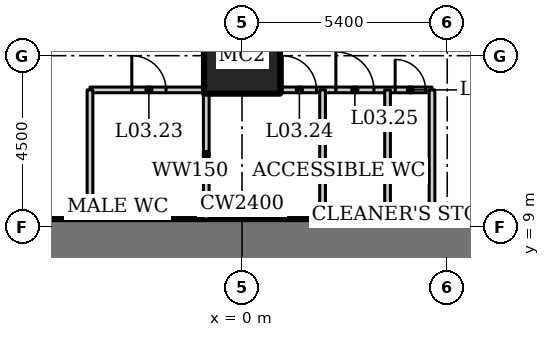
"""IFC4 building model, lengths in metres.
Left out: names, types, materials, properties, quantities, classifications, styles, units other than length and angle.
Written with IfcOpenShell. Run it as: python <this file> out.ifc"""

import sys

from ifc_helpers import new_model, si_unit, direction, frame, frame_2d, origin, origin_2d, place, context, subcontext, project, spatial, rectangle, hollow_rectangle, extrude, element, fill, save


model = new_model("IFC4")
c1 = context("Model", 3, precision=1e-05, world=origin(), true_north=direction((0.0, 1.0)))
c2 = subcontext(c1, "Body", "Model", "MODEL_VIEW")
j1 = project(units=[si_unit("LENGTHUNIT", "METRE"), si_unit("PLANEANGLEUNIT", "RADIAN")], contexts=[c1])
p1 = place(None, origin())
s1 = spatial("IfcSite", under=j1, at=p1, CompositionType="ELEMENT")
p2 = place(p1, origin())
s2 = spatial("IfcBuilding", under=s1, at=p2, CompositionType="ELEMENT")
p3 = place(p2, frame((0.0, 0.0, 22.0)))
s3 = spatial("IfcBuildingStorey", under=s2, at=p3, CompositionType="ELEMENT", Elevation=22.0)
p4 = place(p3, frame((0.0, 13.5, 0.0), z_axis=(0.0, 0.0, 1.0), x_axis=(1.0, 0.0, 0.0)))
e1 = element("IfcColumn", 1, at=p4, inside=s3, PredefinedType="COLUMN", context=c2, shape_type="SweptSolid", body=[
    extrude(hollow_rectangle(XDim=2.0, YDim=2.0, WallThickness=0.17, at=origin_2d()), origin(), (0.0, 0.0, 1.0), 5.0),
])
p5 = place(p3, frame((12.2, 8.0, 0.0), z_axis=(0.0, 0.0, 1.0), x_axis=(-1.0, 0.0, 0.0)))
e2 = element("IfcWall", 2, at=p5, inside=s3, PredefinedType="SHEAR", context=c2, shape_type="SweptSolid", body=[
    extrude(rectangle(XDim=24.4, YDim=2.4, at=frame_2d((12.2, 0.0))), origin(), (0.0, 0.0, 1.0), 5.0),
])
p6 = place(p3, frame((-4.0, 12.6, 0.0), z_axis=(0.0, 0.0, 1.0), x_axis=(1.0, 0.0, 0.0)))
e3 = element("IfcWall", 3, at=p6, inside=s3, PredefinedType="SOLIDWALL", context=c2, shape_type="SweptSolid", body=[
    extrude(rectangle(XDim=9.0, YDim=0.15, at=frame_2d((4.5, 0.0))), origin(), (0.0, 0.0, 1.0), 4.8),
])
p7 = place(p6, frame((1.1, 0.0, 0.0)))
e4 = element("IfcOpeningElement", 4, at=p7, cuts=e3, PredefinedType="OPENING", context=c2, shape_type="SweptSolid", body=[
    extrude(rectangle(XDim=0.9, YDim=2.1, at=frame_2d((0.45, 1.05))), frame((0.0, 0.085, 0.0), z_axis=(0.0, -1.0, 0.0), x_axis=(1.0, 0.0, 0.0)), (0.0, 0.0, 1.0), 0.17),
])
p8 = place(p6, frame((5.06, 0.0, 0.0)))
e5 = element("IfcOpeningElement", 5, at=p8, cuts=e3, PredefinedType="OPENING", context=c2, shape_type="SweptSolid", body=[
    extrude(rectangle(XDim=0.9, YDim=2.1, at=frame_2d((0.45, 1.05))), frame((0.0, 0.085, 0.0), z_axis=(0.0, -1.0, 0.0), x_axis=(1.0, 0.0, 0.0)), (0.0, 0.0, 1.0), 0.17),
])
p9 = place(p6, frame((6.47, 0.0, 0.0)))
e6 = element("IfcOpeningElement", 6, at=p9, cuts=e3, PredefinedType="OPENING", context=c2, shape_type="SweptSolid", body=[
    extrude(rectangle(XDim=1.0, YDim=2.1, at=frame_2d((0.5, 1.05))), frame((0.0, 0.085, 0.0), z_axis=(0.0, -1.0, 0.0), x_axis=(1.0, 0.0, 0.0)), (0.0, 0.0, 1.0), 0.17),
])
p10 = place(p6, frame((8.03, 0.0, 0.0)))
e7 = element("IfcOpeningElement", 7, at=p10, cuts=e3, PredefinedType="OPENING", context=c2, shape_type="SweptSolid", body=[
    extrude(rectangle(XDim=0.8, YDim=2.1, at=frame_2d((0.4, 1.05))), frame((0.0, 0.085, 0.0), z_axis=(0.0, -1.0, 0.0), x_axis=(1.0, 0.0, 0.0)), (0.0, 0.0, 1.0), 0.17),
])
for number, where, z_axis, x_axis in (
    (8, (-4.0, 9.2, 0.0), (0.0, 0.0, 1.0), (0.0, 1.0, 0.0)),
    (9, (5.0, 9.2, 0.0), (0.0, 0.0, 1.0), (0.0, 1.0, 0.0)),
    (10, (-0.94, 9.2, 0.0), (0.0, 0.0, 1.0), (0.0, 1.0, 0.0)),
):
    element("IfcWall", number, at=place(p3, frame(where, z_axis=z_axis, x_axis=x_axis)), inside=s3, PredefinedType="SOLIDWALL", context=c2, shape_type="SweptSolid", body=[
        extrude(rectangle(XDim=3.4, YDim=0.15, at=frame_2d((1.7, 0.0))), origin(), (0.0, 0.0, 1.0), 4.8),
    ])
p11 = place(p3, frame((2.12, 9.2, 0.0), z_axis=(0.0, 0.0, 1.0), x_axis=(0.0, 1.0, 0.0)))
e11 = element("IfcWall", 11, at=p11, inside=s3, PredefinedType="SOLIDWALL", context=c2, shape_type="SweptSolid", body=[
    extrude(rectangle(XDim=3.4, YDim=0.15, at=frame_2d((1.7, 0.0))), origin(), (0.0, 0.0, 1.0), 3.3),
])
p12 = place(p3, frame((3.83, 9.2, 0.0), z_axis=(0.0, 0.0, 1.0), x_axis=(0.0, 1.0, 0.0)))
e12 = element("IfcWall", 12, at=p12, inside=s3, PredefinedType="SOLIDWALL", context=c2, shape_type="SweptSolid", body=[
    extrude(rectangle(XDim=3.4, YDim=0.15, at=frame_2d((1.7, 0.0))), origin(), (0.0, 0.0, 1.0), 4.8),
])
p13 = place(p7, origin())
e13 = element("IfcDoor", 13, at=p13, inside=s3, OperationType="SINGLE_SWING_LEFT", PredefinedType="DOOR", context=c2, shape_type="SweptSolid", body=[
    extrude(rectangle(XDim=0.9, YDim=2.1, at=frame_2d((0.45, 1.05))), frame((0.0, 0.025, 0.0), z_axis=(0.0, -1.0, 0.0), x_axis=(1.0, 0.0, 0.0)), (0.0, 0.0, 1.0), 0.05),
])
fill(e4, e13)
p14 = place(p8, origin())
e14 = element("IfcDoor", 14, at=p14, inside=s3, OperationType="SINGLE_SWING_LEFT", PredefinedType="DOOR", context=c2, shape_type="SweptSolid", body=[
    extrude(rectangle(XDim=0.9, YDim=2.1, at=frame_2d((0.45, 1.05))), frame((0.0, 0.025, 0.0), z_axis=(0.0, -1.0, 0.0), x_axis=(1.0, 0.0, 0.0)), (0.0, 0.0, 1.0), 0.05),
])
fill(e5, e14)
p15 = place(p9, origin())
e15 = element("IfcDoor", 15, at=p15, inside=s3, OperationType="SINGLE_SWING_LEFT", PredefinedType="DOOR", context=c2, shape_type="SweptSolid", body=[
    extrude(rectangle(XDim=1.0, YDim=2.1, at=frame_2d((0.5, 1.05))), frame((0.0, 0.025, 0.0), z_axis=(0.0, -1.0, 0.0), x_axis=(1.0, 0.0, 0.0)), (0.0, 0.0, 1.0), 0.05),
])
fill(e6, e15)
p16 = place(p10, origin())
e16 = element("IfcDoor", 16, at=p16, inside=s3, OperationType="SINGLE_SWING_LEFT", PredefinedType="DOOR", context=c2, shape_type="SweptSolid", body=[
    extrude(rectangle(XDim=0.8, YDim=2.1, at=frame_2d((0.4, 1.05))), frame((0.0, 0.025, 0.0), z_axis=(0.0, -1.0, 0.0), x_axis=(1.0, 0.0, 0.0)), (0.0, 0.0, 1.0), 0.05),
])
fill(e7, e16)
save(model, sys.argv[1])
